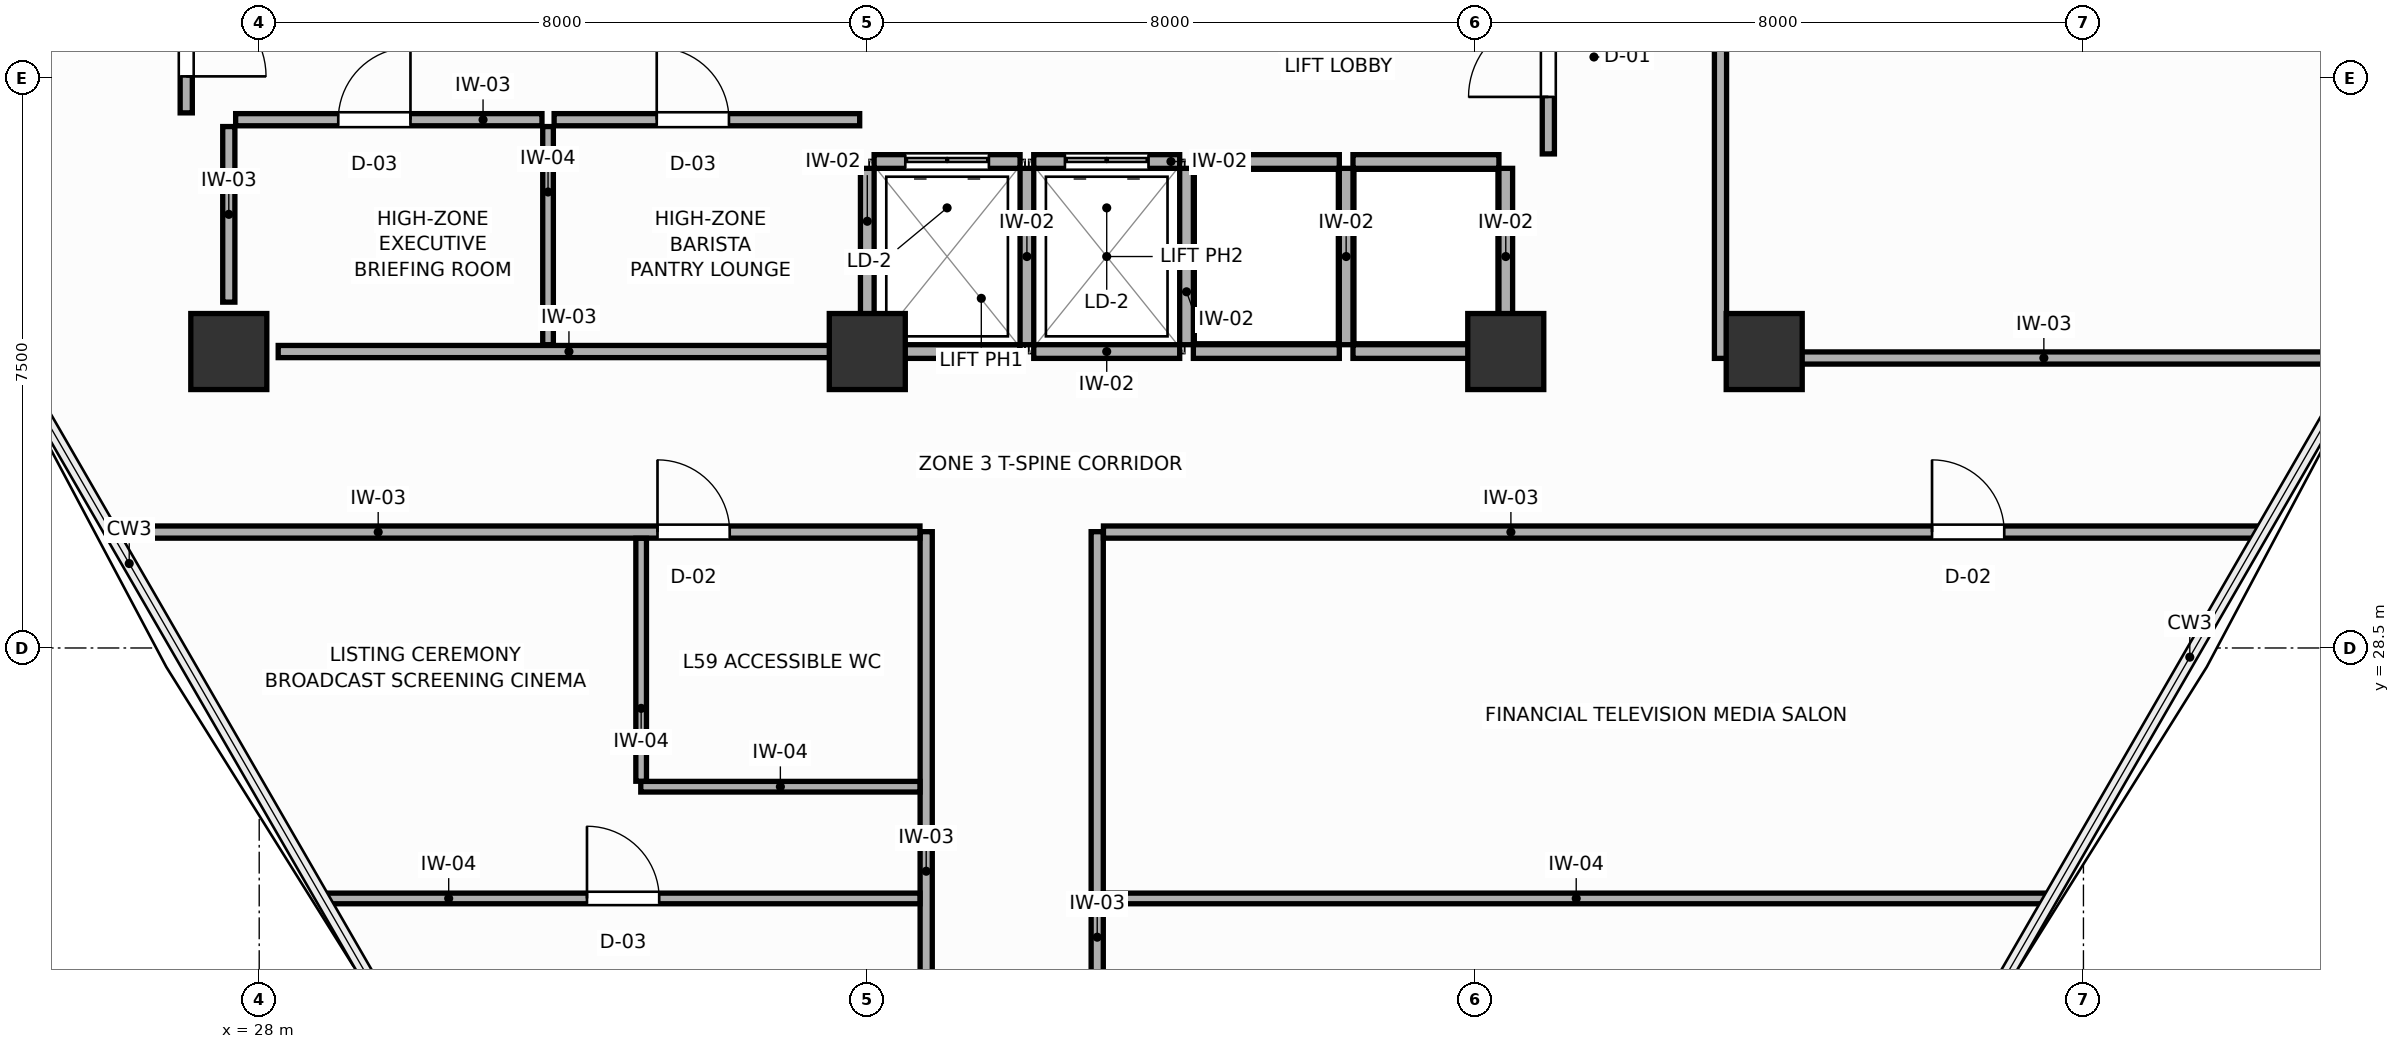
"""IFC4 building model, lengths in metres.
Left out: names, types, materials, properties, quantities, classifications, styles, units other than length and angle.
Written with IfcOpenShell. Run it as: python <this file> out.ifc"""

import sys

from ifc_helpers import new_model, si_unit, direction, frame, frame_2d, origin, origin_2d, place, context, subcontext, project, spatial, rectangle, extrude, source, transform, mapped, element, fill, save


model = new_model("IFC4")
c1 = context("Model", 3, precision=1e-05, world=origin(), true_north=direction((0.0, 1.0)))
c2 = subcontext(c1, "Body", "Model", "MODEL_VIEW")
j1 = project(units=[si_unit("LENGTHUNIT", "METRE"), si_unit("PLANEANGLEUNIT", "RADIAN")], contexts=[c1])
p1 = place(None, origin())
s1 = spatial("IfcSite", under=j1, at=p1, CompositionType="ELEMENT")
p2 = place(p1, origin())
s2 = spatial("IfcBuilding", under=s1, at=p2, CompositionType="ELEMENT")
p3 = place(p2, frame((0.0, 0.0, 227.4)))
s3 = spatial("IfcBuildingStorey", under=s2, at=p3, CompositionType="ELEMENT", Elevation=227.4)
m1 = source(origin(), c2, "Body", "SweptSolid", [
    extrude(rectangle(XDim=1.0, YDim=1.0, at=origin_2d()), origin(), (0.0, 0.0, 1.0), 3.6),
])
for number, where, z_axis, x_axis in (
    (1, (27.6, 32.4, 0.0), (0.0, 0.0, 1.0), (1.0, 0.0, 0.0)),
    (2, (44.4, 32.4, 0.0), (0.0, 0.0, 1.0), (1.0, 0.0, 0.0)),
    (3, (36.0, 32.4, 0.0), (0.0, 0.0, 1.0), (1.0, 0.0, 0.0)),
    (4, (47.8, 32.4, 0.0), (0.0, 0.0, 1.0), (1.0, 0.0, 0.0)),
):
    element("IfcColumn", number, at=place(p3, frame(where, z_axis=z_axis, x_axis=x_axis)), inside=s3, PredefinedType="COLUMN", context=c2, shape_type="MappedRepresentation", body=[
        mapped(m1, transform((0.0, 0.0, 0.0), scale=1.0)),
    ])
p4 = place(p3, frame((36.09, 34.9, 0.0), z_axis=(0.0, 0.0, 1.0), x_axis=(1.0, 0.0, 0.0)))
e5 = element("IfcWall", 5, at=p4, inside=s3, PredefinedType="PARTITIONING", context=c2, shape_type="SweptSolid", body=[
    extrude(rectangle(XDim=1.92, YDim=0.18, at=frame_2d((0.96, 0.0))), origin(), (0.0, 0.0, 1.0), 3.41),
])
p5 = place(p4, frame((0.41, 0.0, 0.0)))
e6 = element("IfcOpeningElement", 6, at=p5, cuts=e5, PredefinedType="OPENING", context=c2, shape_type="SweptSolid", body=[
    extrude(rectangle(XDim=1.1, YDim=2.1, at=frame_2d((0.55, 1.05))), frame((0.0, 0.1, 0.0), z_axis=(0.0, -1.0, 0.0), x_axis=(1.0, 0.0, 0.0)), (0.0, 0.0, 1.0), 0.2),
])
p6 = place(p3, frame((36.09, 32.4, 0.0), z_axis=(0.0, 0.0, 1.0), x_axis=(1.0, 0.0, 0.0)))
e7 = element("IfcWall", 7, at=p6, inside=s3, PredefinedType="PARTITIONING", context=c2, shape_type="SweptSolid", body=[
    extrude(rectangle(XDim=1.92, YDim=0.18, at=frame_2d((0.96, 0.0))), origin(), (0.0, 0.0, 1.0), 2.96),
])
p7 = place(p3, frame((36.0, 32.49, 0.0), z_axis=(0.0, 0.0, 1.0), x_axis=(0.0, 1.0, 0.0)))
e8 = element("IfcWall", 8, at=p7, inside=s3, PredefinedType="PARTITIONING", context=c2, shape_type="SweptSolid", body=[
    extrude(rectangle(XDim=2.32, YDim=0.18, at=frame_2d((1.16, 0.0))), origin(), (0.0, 0.0, 1.0), 3.41),
])
p8 = place(p3, frame((38.19, 34.9, 0.0), z_axis=(0.0, 0.0, 1.0), x_axis=(1.0, 0.0, 0.0)))
e9 = element("IfcWall", 9, at=p8, inside=s3, PredefinedType="PARTITIONING", context=c2, shape_type="SweptSolid", body=[
    extrude(rectangle(XDim=1.92, YDim=0.18, at=frame_2d((0.96, 0.0))), origin(), (0.0, 0.0, 1.0), 3.41),
])
p9 = place(p8, frame((0.41, 0.0, 0.0)))
e10 = element("IfcOpeningElement", 10, at=p9, cuts=e9, PredefinedType="OPENING", context=c2, shape_type="SweptSolid", body=[
    extrude(rectangle(XDim=1.1, YDim=2.1, at=frame_2d((0.55, 1.05))), frame((0.0, 0.1, 0.0), z_axis=(0.0, -1.0, 0.0), x_axis=(1.0, 0.0, 0.0)), (0.0, 0.0, 1.0), 0.2),
])
p10 = place(p3, frame((38.19, 32.4, 0.0), z_axis=(0.0, 0.0, 1.0), x_axis=(1.0, 0.0, 0.0)))
e11 = element("IfcWall", 11, at=p10, inside=s3, PredefinedType="PARTITIONING", context=c2, shape_type="SweptSolid", body=[
    extrude(rectangle(XDim=1.92, YDim=0.18, at=frame_2d((0.96, 0.0))), origin(), (0.0, 0.0, 1.0), 2.96),
])
p11 = place(p3, frame((38.1, 32.49, 0.0), z_axis=(0.0, 0.0, 1.0), x_axis=(0.0, 1.0, 0.0)))
e12 = element("IfcWall", 12, at=p11, inside=s3, PredefinedType="PARTITIONING", context=c2, shape_type="SweptSolid", body=[
    extrude(rectangle(XDim=2.32, YDim=0.18, at=frame_2d((1.16, 0.0))), origin(), (0.0, 0.0, 1.0), 3.41),
])
p12 = place(p3, frame((40.29, 34.9, 0.0), z_axis=(0.0, 0.0, 1.0), x_axis=(1.0, 0.0, 0.0)))
e13 = element("IfcWall", 13, at=p12, inside=s3, PredefinedType="PARTITIONING", context=c2, shape_type="SweptSolid", body=[
    extrude(rectangle(XDim=1.92, YDim=0.18, at=frame_2d((0.96, 0.0))), origin(), (0.0, 0.0, 1.0), 3.41),
])
p13 = place(p3, frame((40.29, 32.4, 0.0), z_axis=(0.0, 0.0, 1.0), x_axis=(1.0, 0.0, 0.0)))
e14 = element("IfcWall", 14, at=p13, inside=s3, PredefinedType="PARTITIONING", context=c2, shape_type="SweptSolid", body=[
    extrude(rectangle(XDim=1.92, YDim=0.18, at=frame_2d((0.96, 0.0))), origin(), (0.0, 0.0, 1.0), 2.96),
])
p14 = place(p3, frame((40.2, 32.49, 0.0), z_axis=(0.0, 0.0, 1.0), x_axis=(0.0, 1.0, 0.0)))
e15 = element("IfcWall", 15, at=p14, inside=s3, PredefinedType="PARTITIONING", context=c2, shape_type="SweptSolid", body=[
    extrude(rectangle(XDim=2.32, YDim=0.18, at=frame_2d((1.16, 0.0))), origin(), (0.0, 0.0, 1.0), 3.41),
])
p15 = place(p3, frame((42.39, 34.9, 0.0), z_axis=(0.0, 0.0, 1.0), x_axis=(1.0, 0.0, 0.0)))
e16 = element("IfcWall", 16, at=p15, inside=s3, PredefinedType="PARTITIONING", context=c2, shape_type="SweptSolid", body=[
    extrude(rectangle(XDim=1.92, YDim=0.18, at=frame_2d((0.96, 0.0))), origin(), (0.0, 0.0, 1.0), 3.41),
])
p16 = place(p3, frame((42.39, 32.4, 0.0), z_axis=(0.0, 0.0, 1.0), x_axis=(1.0, 0.0, 0.0)))
e17 = element("IfcWall", 17, at=p16, inside=s3, PredefinedType="PARTITIONING", context=c2, shape_type="SweptSolid", body=[
    extrude(rectangle(XDim=1.92, YDim=0.18, at=frame_2d((0.96, 0.0))), origin(), (0.0, 0.0, 1.0), 2.96),
])
for number, where, z_axis, x_axis in (
    (18, (42.3, 32.49, 0.0), (0.0, 0.0, 1.0), (0.0, 1.0, 0.0)),
    (19, (44.4, 32.49, 0.0), (0.0, 0.0, 1.0), (0.0, 1.0, 0.0)),
):
    element("IfcWall", number, at=place(p3, frame(where, z_axis=z_axis, x_axis=x_axis)), inside=s3, PredefinedType="PARTITIONING", context=c2, shape_type="SweptSolid", body=[
        extrude(rectangle(XDim=2.32, YDim=0.18, at=frame_2d((1.16, 0.0))), origin(), (0.0, 0.0, 1.0), 3.41),
    ])
p17 = place(p3, frame((28.25, 32.4, 0.0), z_axis=(0.0, 0.0, 1.0), x_axis=(1.0, 0.0, 0.0)))
e20 = element("IfcWall", 20, at=p17, inside=s3, PredefinedType="PARTITIONING", context=c2, shape_type="SweptSolid", body=[
    extrude(rectangle(XDim=7.65, YDim=0.16, at=frame_2d((3.825, 0.0))), origin(), (0.0, 0.0, 1.0), 2.96),
])
p18 = place(p3, frame((27.6, 33.05, 0.0), z_axis=(0.0, 0.0, 1.0), x_axis=(0.0, 1.0, 0.0)))
e21 = element("IfcWall", 21, at=p18, inside=s3, PredefinedType="PARTITIONING", context=c2, shape_type="SweptSolid", body=[
    extrude(rectangle(XDim=2.31, YDim=0.16, at=frame_2d((1.155, 0.0))), origin(), (0.0, 0.0, 1.0), 3.41),
])
p19 = place(p3, frame((31.8, 32.49, 0.0), z_axis=(0.0, 0.0, 1.0), x_axis=(0.0, 1.0, 0.0)))
e22 = element("IfcWall", 22, at=p19, inside=s3, PredefinedType="PARTITIONING", context=c2, shape_type="SweptSolid", body=[
    extrude(rectangle(XDim=2.87, YDim=0.14, at=frame_2d((1.435, 0.0))), origin(), (0.0, 0.0, 1.0), 3.41),
])
p20 = place(p3, frame((27.69, 35.45, 0.0), z_axis=(0.0, 0.0, 1.0), x_axis=(1.0, 0.0, 0.0)))
e23 = element("IfcWall", 23, at=p20, inside=s3, PredefinedType="PARTITIONING", context=c2, shape_type="SweptSolid", body=[
    extrude(rectangle(XDim=4.03, YDim=0.16, at=frame_2d((2.015, 0.0))), origin(), (0.0, 0.0, 1.0), 3.41),
])
p21 = place(p20, frame((1.35, 0.0, 0.0)))
e24 = element("IfcOpeningElement", 24, at=p21, cuts=e23, PredefinedType="OPENING", context=c2, shape_type="SweptSolid", body=[
    extrude(rectangle(XDim=0.95, YDim=2.05, at=frame_2d((0.475, 1.025))), frame((0.0, 0.09, 0.0), z_axis=(0.0, -1.0, 0.0), x_axis=(1.0, 0.0, 0.0)), (0.0, 0.0, 1.0), 0.18),
])
p22 = place(p3, frame((31.88, 35.45, 0.0), z_axis=(0.0, 0.0, 1.0), x_axis=(1.0, 0.0, 0.0)))
e25 = element("IfcWall", 25, at=p22, inside=s3, PredefinedType="PARTITIONING", context=c2, shape_type="SweptSolid", body=[
    extrude(rectangle(XDim=4.02, YDim=0.16, at=frame_2d((2.01, 0.0))), origin(), (0.0, 0.0, 1.0), 3.41),
])
p23 = place(p22, frame((1.35, 0.0, 0.0)))
e26 = element("IfcOpeningElement", 26, at=p23, cuts=e25, PredefinedType="OPENING", context=c2, shape_type="SweptSolid", body=[
    extrude(rectangle(XDim=0.95, YDim=2.05, at=frame_2d((0.475, 1.025))), frame((0.0, 0.09, 0.0), z_axis=(0.0, -1.0, 0.0), x_axis=(1.0, 0.0, 0.0)), (0.0, 0.0, 1.0), 0.18),
])
p24 = place(p3, frame((27.04, 35.54, 0.0), z_axis=(0.0, 0.0, 1.0), x_axis=(0.0, 1.0, 0.0)))
e27 = element("IfcWall", 27, at=p24, inside=s3, PredefinedType="PARTITIONING", context=c2, shape_type="SweptSolid", body=[
    extrude(rectangle(XDim=2.11, YDim=0.16, at=frame_2d((1.055, 0.0))), origin(), (0.0, 0.0, 1.0), 3.41),
])
p25 = place(p24, frame((0.48, 0.0, 0.0)))
e28 = element("IfcOpeningElement", 28, at=p25, cuts=e27, PredefinedType="OPENING", context=c2, shape_type="SweptSolid", body=[
    extrude(rectangle(XDim=1.05, YDim=2.1, at=frame_2d((0.525, 1.05))), frame((0.0, 0.09, 0.0), z_axis=(0.0, -1.0, 0.0), x_axis=(1.0, 0.0, 0.0)), (0.0, 0.0, 1.0), 0.18),
])
p26 = place(p3, frame((44.96, 35.0, 0.0), z_axis=(0.0, 0.0, 1.0), x_axis=(0.0, 1.0, 0.0)))
e29 = element("IfcWall", 29, at=p26, inside=s3, PredefinedType="PARTITIONING", context=c2, shape_type="SweptSolid", body=[
    extrude(rectangle(XDim=2.65, YDim=0.16, at=frame_2d((1.325, 0.0))), origin(), (0.0, 0.0, 1.0), 3.41),
])
p27 = place(p26, frame((0.75, 0.0, 0.0)))
e30 = element("IfcOpeningElement", 30, at=p27, cuts=e29, PredefinedType="OPENING", context=c2, shape_type="SweptSolid", body=[
    extrude(rectangle(XDim=1.05, YDim=2.1, at=frame_2d((0.525, 1.05))), frame((0.0, 0.09, 0.0), z_axis=(0.0, -1.0, 0.0), x_axis=(1.0, 0.0, 0.0)), (0.0, 0.0, 1.0), 0.18),
])
p28 = place(p3, frame((47.225, 32.31, 0.0), z_axis=(0.0, 0.0, 1.0), x_axis=(0.0, 1.0, 0.0)))
e31 = element("IfcWall", 31, at=p28, inside=s3, PredefinedType="PARTITIONING", context=c2, shape_type="SweptSolid", body=[
    extrude(rectangle(XDim=18.761, YDim=0.16, at=frame_2d((9.38, 0.0))), origin(), (0.0, 0.0, 1.0), 3.41),
])
p29 = place(p28, frame((8.906, 0.0, 0.0)))
e32 = element("IfcOpeningElement", 32, at=p29, cuts=e31, PredefinedType="OPENING", context=c2, shape_type="SweptSolid", body=[
    extrude(rectangle(XDim=0.95, YDim=2.05, at=frame_2d((0.475, 1.025))), frame((0.0, 0.09, 0.0), z_axis=(0.0, -1.0, 0.0), x_axis=(1.0, 0.0, 0.0)), (0.0, 0.0, 1.0), 0.18),
])
p30 = place(p3, frame((39.025, 12.316, 0.0), z_axis=(0.0, 0.0, 1.0), x_axis=(0.0, 1.0, 0.0)))
e33 = element("IfcWall", 33, at=p30, inside=s3, PredefinedType="PARTITIONING", context=c2, shape_type="SweptSolid", body=[
    extrude(rectangle(XDim=17.714, YDim=0.16, at=frame_2d((8.857, 0.0))), origin(), (0.0, 0.0, 1.0), 3.41),
])
p31 = place(p30, frame((5.914, 0.0, 0.0)))
e34 = element("IfcOpeningElement", 34, at=p31, cuts=e33, PredefinedType="OPENING", context=c2, shape_type="SweptSolid", body=[
    extrude(rectangle(XDim=0.95, YDim=2.05, at=frame_2d((0.475, 1.025))), frame((0.0, 0.09, 0.0), z_axis=(0.0, -1.0, 0.0), x_axis=(1.0, 0.0, 0.0)), (0.0, 0.0, 1.0), 0.18),
])
p32 = place(p3, frame((39.107, 30.025, 0.0), z_axis=(0.0, 0.0, 1.0), x_axis=(1.0, 0.0, 0.0)))
e35 = element("IfcWall", 35, at=p32, inside=s3, PredefinedType="PARTITIONING", context=c2, shape_type="SweptSolid", body=[
    extrude(rectangle(XDim=15.222, YDim=0.16, at=frame_2d((7.611, 0.0))), origin(), (0.0, 0.0, 1.0), 3.41),
])
p33 = place(p32, frame((10.901, 0.0, 0.0)))
e36 = element("IfcOpeningElement", 36, at=p33, cuts=e35, PredefinedType="OPENING", context=c2, shape_type="SweptSolid", body=[
    extrude(rectangle(XDim=0.95, YDim=2.05, at=frame_2d((0.475, 1.025))), frame((0.0, 0.09, 0.0), z_axis=(0.0, -1.0, 0.0), x_axis=(1.0, 0.0, 0.0)), (0.0, 0.0, 1.0), 0.18),
])
p34 = place(p3, frame((36.775, 14.781, 0.0), z_axis=(0.0, 0.0, 1.0), x_axis=(0.0, 1.0, 0.0)))
e37 = element("IfcWall", 37, at=p34, inside=s3, PredefinedType="PARTITIONING", context=c2, shape_type="SweptSolid", body=[
    extrude(rectangle(XDim=15.249, YDim=0.16, at=frame_2d((7.624, 0.0))), origin(), (0.0, 0.0, 1.0), 2.96),
])
p35 = place(p34, frame((5.185, 0.0, 0.0)))
e38 = element("IfcOpeningElement", 38, at=p35, cuts=e37, PredefinedType="OPENING", context=c2, shape_type="SweptSolid", body=[
    extrude(rectangle(XDim=0.95, YDim=2.05, at=frame_2d((0.475, 1.025))), frame((0.0, 0.09, 0.0), z_axis=(0.0, -1.0, 0.0), x_axis=(1.0, 0.0, 0.0)), (0.0, 0.0, 1.0), 0.18),
])
p36 = place(p3, frame((26.071, 30.025, 0.0), z_axis=(0.0, 0.0, 1.0), x_axis=(1.0, 0.0, 0.0)))
e39 = element("IfcWall", 39, at=p36, inside=s3, PredefinedType="PARTITIONING", context=c2, shape_type="SweptSolid", body=[
    extrude(rectangle(XDim=10.622, YDim=0.16, at=frame_2d((5.311, 0.0))), origin(), (0.0, 0.0, 1.0), 3.41),
])
p37 = place(p36, frame((7.169, 0.0, 0.0)))
e40 = element("IfcOpeningElement", 40, at=p37, cuts=e39, PredefinedType="OPENING", context=c2, shape_type="SweptSolid", body=[
    extrude(rectangle(XDim=0.95, YDim=2.05, at=frame_2d((0.475, 1.025))), frame((0.0, 0.09, 0.0), z_axis=(0.0, -1.0, 0.0), x_axis=(1.0, 0.0, 0.0)), (0.0, 0.0, 1.0), 0.18),
])
p38 = place(p3, frame((47.307, 32.315, 0.0), z_axis=(0.0, 0.0, 1.0), x_axis=(1.0, 0.0, 0.0)))
e41 = element("IfcWall", 41, at=p38, inside=s3, PredefinedType="PARTITIONING", context=c2, shape_type="SweptSolid", body=[
    extrude(rectangle(XDim=8.344, YDim=0.16, at=frame_2d((4.172, 0.0))), origin(), (0.0, 0.0, 1.0), 2.96),
])
p39 = place(p3, frame((39.107, 25.205, 0.0), z_axis=(0.0, 0.0, 1.0), x_axis=(1.0, 0.0, 0.0)))
e42 = element("IfcWall", 42, at=p39, inside=s3, PredefinedType="PARTITIONING", context=c2, shape_type="SweptSolid", body=[
    extrude(rectangle(XDim=12.439, YDim=0.14, at=frame_2d((6.22, 0.0))), origin(), (0.0, 0.0, 1.0), 3.41),
])
p40 = place(p3, frame((28.854, 25.205, 0.0), z_axis=(0.0, 0.0, 1.0), x_axis=(1.0, 0.0, 0.0)))
e43 = element("IfcWall", 43, at=p40, inside=s3, PredefinedType="PARTITIONING", context=c2, shape_type="SweptSolid", body=[
    extrude(rectangle(XDim=7.84, YDim=0.14, at=frame_2d((3.92, 0.0))), origin(), (0.0, 0.0, 1.0), 3.41),
])
p41 = place(p40, frame((3.459, 0.0, 0.0)))
e44 = element("IfcOpeningElement", 44, at=p41, cuts=e43, PredefinedType="OPENING", context=c2, shape_type="SweptSolid", body=[
    extrude(rectangle(XDim=0.95, YDim=2.05, at=frame_2d((0.475, 1.025))), frame((0.0, 0.08, 0.0), z_axis=(0.0, -1.0, 0.0), x_axis=(1.0, 0.0, 0.0)), (0.0, 0.0, 1.0), 0.16),
])
p42 = place(p3, frame((33.02, 26.675, 0.0), z_axis=(0.0, 0.0, 1.0), x_axis=(1.0, 0.0, 0.0)))
e45 = element("IfcWall", 45, at=p42, inside=s3, PredefinedType="PARTITIONING", context=c2, shape_type="SweptSolid", body=[
    extrude(rectangle(XDim=3.673, YDim=0.14, at=frame_2d((1.836, 0.0))), origin(), (0.0, 0.0, 1.0), 3.41),
])
p43 = place(p3, frame((33.025, 26.747, 0.0), z_axis=(0.0, 0.0, 1.0), x_axis=(0.0, 1.0, 0.0)))
e46 = element("IfcWall", 46, at=p43, inside=s3, PredefinedType="PARTITIONING", context=c2, shape_type="SweptSolid", body=[
    extrude(rectangle(XDim=3.196, YDim=0.14, at=frame_2d((1.598, 0.0))), origin(), (0.0, 0.0, 1.0), 3.41),
])
p44 = place(p5, origin())
e47 = element("IfcDoor", 47, at=p44, inside=s3, OperationType="DOUBLE_DOOR_SLIDING", PredefinedType="DOOR", context=c2, shape_type="SweptSolid", body=[
    extrude(rectangle(XDim=1.1, YDim=2.1, at=frame_2d((0.55, 1.05))), frame((0.0, 0.025, 0.0), z_axis=(0.0, -1.0, 0.0), x_axis=(1.0, 0.0, 0.0)), (0.0, 0.0, 1.0), 0.05),
])
fill(e6, e47)
p45 = place(p9, origin())
e48 = element("IfcDoor", 48, at=p45, inside=s3, OperationType="DOUBLE_DOOR_SLIDING", PredefinedType="DOOR", context=c2, shape_type="SweptSolid", body=[
    extrude(rectangle(XDim=1.1, YDim=2.1, at=frame_2d((0.55, 1.05))), frame((0.0, 0.025, 0.0), z_axis=(0.0, -1.0, 0.0), x_axis=(1.0, 0.0, 0.0)), (0.0, 0.0, 1.0), 0.05),
])
fill(e10, e48)
p46 = place(p21, origin())
e49 = element("IfcDoor", 49, at=p46, inside=s3, OperationType="SINGLE_SWING_RIGHT", PredefinedType="DOOR", context=c2, shape_type="SweptSolid", body=[
    extrude(rectangle(XDim=0.95, YDim=2.05, at=frame_2d((0.475, 1.025))), frame((0.0, 0.025, 0.0), z_axis=(0.0, -1.0, 0.0), x_axis=(1.0, 0.0, 0.0)), (0.0, 0.0, 1.0), 0.05),
])
fill(e24, e49)
p47 = place(p23, origin())
e50 = element("IfcDoor", 50, at=p47, inside=s3, OperationType="SINGLE_SWING_LEFT", PredefinedType="DOOR", context=c2, shape_type="SweptSolid", body=[
    extrude(rectangle(XDim=0.95, YDim=2.05, at=frame_2d((0.475, 1.025))), frame((0.0, 0.025, 0.0), z_axis=(0.0, -1.0, 0.0), x_axis=(1.0, 0.0, 0.0)), (0.0, 0.0, 1.0), 0.05),
])
fill(e26, e50)
p48 = place(p25, frame((1.05, 0.0, 0.0), z_axis=(0.0, 0.0, 1.0), x_axis=(-1.0, 0.0, 0.0)))
e51 = element("IfcDoor", 51, at=p48, inside=s3, OperationType="SINGLE_SWING_RIGHT", PredefinedType="DOOR", context=c2, shape_type="SweptSolid", body=[
    extrude(rectangle(XDim=1.05, YDim=2.1, at=frame_2d((0.525, 1.05))), frame((0.0, 0.025, 0.0), z_axis=(0.0, -1.0, 0.0), x_axis=(1.0, 0.0, 0.0)), (0.0, 0.0, 1.0), 0.05),
])
fill(e28, e51)
p49 = place(p27, origin())
e52 = element("IfcDoor", 52, at=p49, inside=s3, OperationType="SINGLE_SWING_LEFT", PredefinedType="DOOR", context=c2, shape_type="SweptSolid", body=[
    extrude(rectangle(XDim=1.05, YDim=2.1, at=frame_2d((0.525, 1.05))), frame((0.0, 0.025, 0.0), z_axis=(0.0, -1.0, 0.0), x_axis=(1.0, 0.0, 0.0)), (0.0, 0.0, 1.0), 0.05),
])
fill(e30, e52)
p50 = place(p33, origin())
e53 = element("IfcDoor", 53, at=p50, inside=s3, OperationType="SINGLE_SWING_LEFT", PredefinedType="DOOR", context=c2, shape_type="SweptSolid", body=[
    extrude(rectangle(XDim=0.95, YDim=2.05, at=frame_2d((0.475, 1.025))), frame((0.0, 0.025, 0.0), z_axis=(0.0, -1.0, 0.0), x_axis=(1.0, 0.0, 0.0)), (0.0, 0.0, 1.0), 0.05),
])
fill(e36, e53)
p51 = place(p37, origin())
e54 = element("IfcDoor", 54, at=p51, inside=s3, OperationType="SINGLE_SWING_LEFT", PredefinedType="DOOR", context=c2, shape_type="SweptSolid", body=[
    extrude(rectangle(XDim=0.95, YDim=2.05, at=frame_2d((0.475, 1.025))), frame((0.0, 0.025, 0.0), z_axis=(0.0, -1.0, 0.0), x_axis=(1.0, 0.0, 0.0)), (0.0, 0.0, 1.0), 0.05),
])
fill(e40, e54)
p52 = place(p41, origin())
e55 = element("IfcDoor", 55, at=p52, inside=s3, OperationType="SINGLE_SWING_LEFT", PredefinedType="DOOR", context=c2, shape_type="SweptSolid", body=[
    extrude(rectangle(XDim=0.95, YDim=2.05, at=frame_2d((0.475, 1.025))), frame((0.0, 0.025, 0.0), z_axis=(0.0, -1.0, 0.0), x_axis=(1.0, 0.0, 0.0)), (0.0, 0.0, 1.0), 0.05),
])
fill(e44, e55)
save(model, sys.argv[1])
